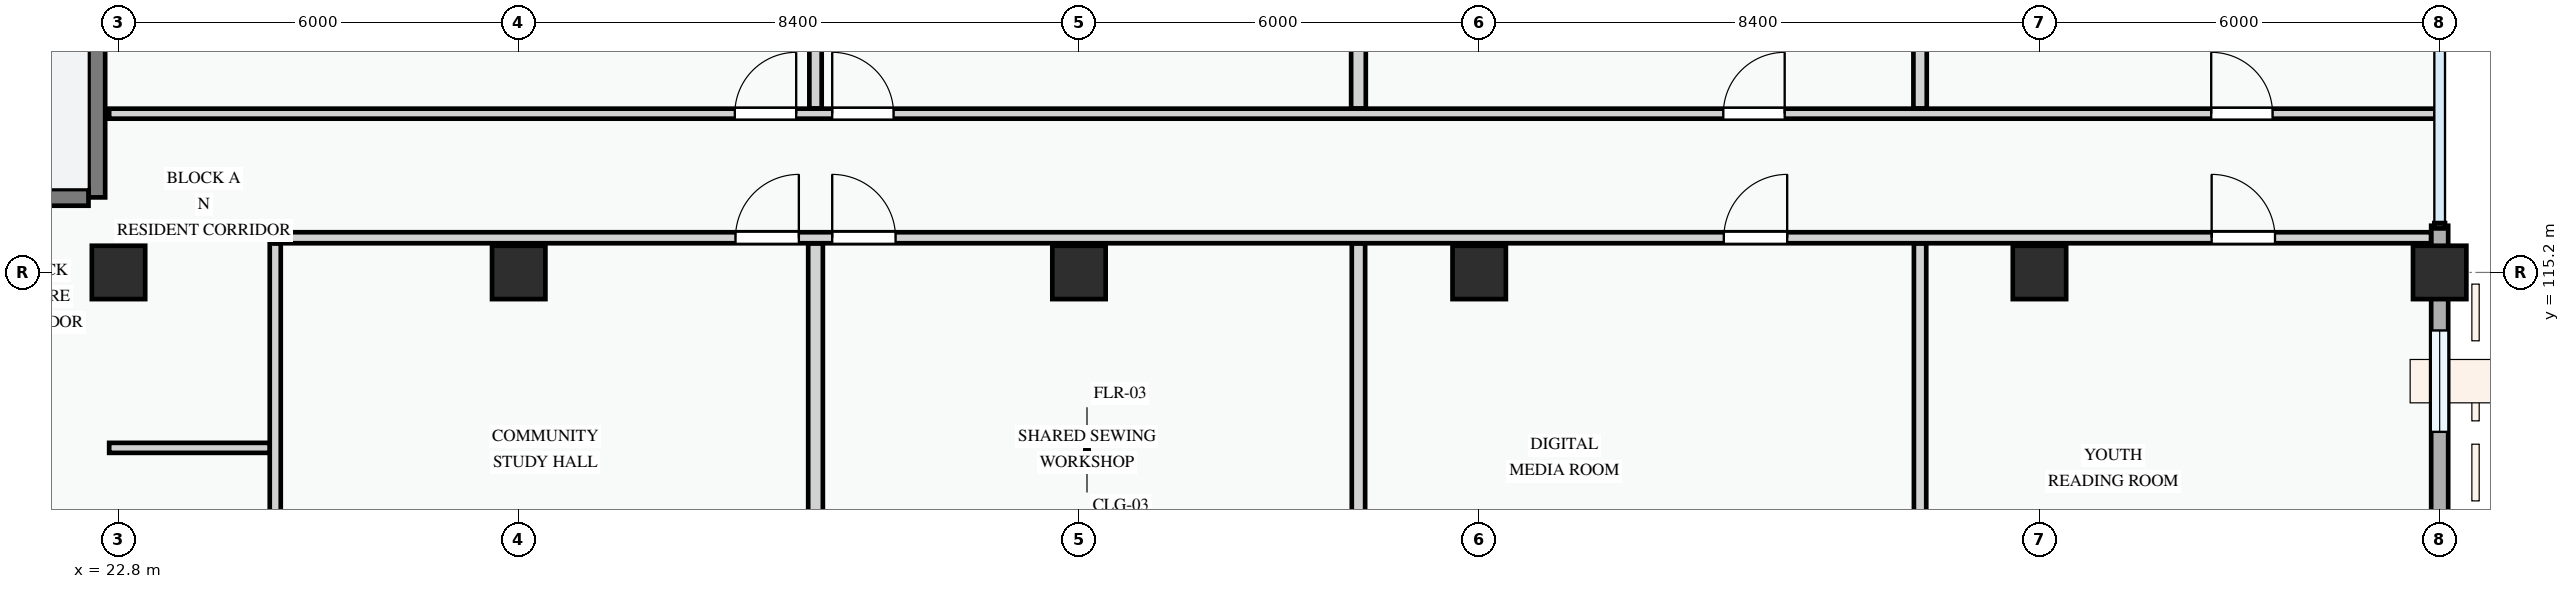
"""IFC4 building model, lengths in metres.
Left out: names, types, materials, properties, quantities, classifications, styles, units other than length and angle.
Written with IfcOpenShell. Run it as: python <this file> out.ifc"""

import sys

from ifc_helpers import new_model, si_unit, direction, frame, frame_2d, origin, origin_2d, place, context, subcontext, project, spatial, rectangle, extrude, element, fill, save


model = new_model("IFC4")
c1 = context("Model", 3, precision=1e-05, world=origin(), true_north=direction((0.0, 1.0)))
c2 = subcontext(c1, "Body", "Model", "MODEL_VIEW")
j1 = project(units=[si_unit("LENGTHUNIT", "METRE"), si_unit("PLANEANGLEUNIT", "RADIAN")], contexts=[c1])
p1 = place(None, origin())
s1 = spatial("IfcSite", under=j1, at=p1, CompositionType="ELEMENT")
p2 = place(p1, origin())
s2 = spatial("IfcBuilding", under=s1, at=p2, CompositionType="ELEMENT")
p3 = place(p2, frame((0.0, 0.0, 4.5)))
s3 = spatial("IfcBuildingStorey", under=s2, at=p3, CompositionType="ELEMENT", Elevation=4.5)
for number, where, z_axis, x_axis in (
    (1, (22.8, 115.2, 0.0), (0.0, 0.0, 1.0), (1.0, 0.0, 0.0)),
    (2, (28.8, 115.2, 0.0), (0.0, 0.0, 1.0), (1.0, 0.0, 0.0)),
    (3, (37.2, 115.2, 0.0), (0.0, 0.0, 1.0), (1.0, 0.0, 0.0)),
    (4, (43.2, 115.2, 0.0), (0.0, 0.0, 1.0), (1.0, 0.0, 0.0)),
    (5, (51.6, 115.2, 0.0), (0.0, 0.0, 1.0), (1.0, 0.0, 0.0)),
    (6, (57.6, 115.2, 0.0), (0.0, 0.0, 1.0), (1.0, 0.0, 0.0)),
):
    element("IfcColumn", number, at=place(p3, frame(where, z_axis=z_axis, x_axis=x_axis)), inside=s3, PredefinedType="COLUMN", context=c2, shape_type="SweptSolid", body=[
        extrude(rectangle(XDim=0.8, YDim=0.8, at=origin_2d()), origin(), (0.0, 0.0, 1.0), 3.6),
    ])
p4 = place(p3, frame((57.6, 109.2, 0.0), z_axis=(0.0, 0.0, 1.0), x_axis=(0.0, 1.0, 0.0)))
e7 = element("IfcWall", 7, at=p4, inside=s3, PredefinedType="STANDARD", context=c2, shape_type="SweptSolid", body=[
    extrude(rectangle(XDim=6.0, YDim=0.255, at=frame_2d((3.0, 0.0))), origin(), (0.0, 0.0, 1.0), 2.875),
])
p5 = place(p4, frame((1.055, 0.0, 0.78)))
e8 = element("IfcOpeningElement", 8, at=p5, cuts=e7, PredefinedType="OPENING", context=c2, shape_type="SweptSolid", body=[
    extrude(rectangle(XDim=1.15, YDim=1.25, at=frame_2d((0.575, 0.625))), frame((0.0, 0.137, 0.0), z_axis=(0.0, -1.0, 0.0), x_axis=(1.0, 0.0, 0.0)), (0.0, 0.0, 1.0), 0.275),
])
p6 = place(p4, frame((3.61, 0.0, 0.78)))
e9 = element("IfcOpeningElement", 9, at=p6, cuts=e7, PredefinedType="OPENING", context=c2, shape_type="SweptSolid", body=[
    extrude(rectangle(XDim=1.52, YDim=1.42, at=frame_2d((0.76, 0.71))), frame((0.0, 0.137, 0.0), z_axis=(0.0, -1.0, 0.0), x_axis=(1.0, 0.0, 0.0)), (0.0, 0.0, 1.0), 0.275),
])
p7 = place(p3, frame((57.6, 115.2, 0.0), z_axis=(0.0, 0.0, 1.0), x_axis=(0.0, 1.0, 0.0)))
e10 = element("IfcWall", 10, at=p7, inside=s3, PredefinedType="STANDARD", context=c2, shape_type="SweptSolid", body=[
    extrude(rectangle(XDim=0.7, YDim=0.255, at=frame_2d((0.35, 0.0))), origin(), (0.0, 0.0, 1.0), 2.725),
])
p8 = place(p3, frame((22.475, 123.25, 0.0), z_axis=(0.0, 0.0, 1.0), x_axis=(0.0, -1.0, 0.0)))
e11 = element("IfcWall", 11, at=p8, inside=s3, PredefinedType="SHEAR", context=c2, shape_type="SweptSolid", body=[
    extrude(rectangle(XDim=6.925, YDim=0.25, at=frame_2d((3.462, 0.0))), origin(), (0.0, 0.0, 1.0), 3.3),
])
p9 = place(p3, frame((8.85, 116.325, 0.0), z_axis=(0.0, 0.0, 1.0), x_axis=(1.0, 0.0, 0.0)))
e12 = element("IfcWall", 12, at=p9, inside=s3, PredefinedType="SHEAR", context=c2, shape_type="SweptSolid", body=[
    extrude(rectangle(XDim=13.5, YDim=0.25, at=frame_2d((6.75, 0.0))), origin(), (0.0, 0.0, 1.0), 3.3),
])
p10 = place(p9, frame((6.2, 0.0, 0.0)))
e13 = element("IfcOpeningElement", 13, at=p10, cuts=e12, PredefinedType="OPENING", context=c2, shape_type="SweptSolid", body=[
    extrude(rectangle(XDim=1.1, YDim=2.15, at=frame_2d((0.55, 1.075))), frame((0.0, 0.135, 0.0), z_axis=(0.0, -1.0, 0.0), x_axis=(1.0, 0.0, 0.0)), (0.0, 0.0, 1.0), 0.27),
])
p11 = place(p3, frame((25.15, 109.33, 0.0), z_axis=(0.0, 0.0, 1.0), x_axis=(0.0, 1.0, 0.0)))
e14 = element("IfcWall", 14, at=p11, inside=s3, PredefinedType="PARTITIONING", context=c2, shape_type="SweptSolid", body=[
    extrude(rectangle(XDim=6.306, YDim=0.165, at=frame_2d((3.153, 0.0))), origin(), (0.0, 0.0, 1.0), 3.3),
])
p12 = place(p3, frame((22.66, 112.57, 0.0), z_axis=(0.0, 0.0, 1.0), x_axis=(1.0, 0.0, 0.0)))
e15 = element("IfcWall", 15, at=p12, inside=s3, PredefinedType="PARTITIONING", context=c2, shape_type="SweptSolid", body=[
    extrude(rectangle(XDim=2.406, YDim=0.15, at=frame_2d((1.203, 0.0))), origin(), (0.0, 0.0, 1.0), 3.3),
])
p13 = place(p3, frame((33.25, 109.26, 0.0), z_axis=(0.0, 0.0, 1.0), x_axis=(0.0, 1.0, 0.0)))
e16 = element("IfcWall", 16, at=p13, inside=s3, PredefinedType="PARTITIONING", context=c2, shape_type="SweptSolid", body=[
    extrude(rectangle(XDim=6.375, YDim=0.22, at=frame_2d((3.188, 0.0))), origin(), (0.0, 0.0, 1.0), 2.885),
])
p14 = place(p3, frame((33.25, 117.657, 0.0), z_axis=(0.0, 0.0, 1.0), x_axis=(0.0, 1.0, 0.0)))
e17 = element("IfcWall", 17, at=p14, inside=s3, PredefinedType="PARTITIONING", context=c2, shape_type="SweptSolid", body=[
    extrude(rectangle(XDim=5.813, YDim=0.185, at=frame_2d((2.907, 0.0))), origin(), (0.0, 0.0, 1.0), 2.885),
])
p15 = place(p3, frame((41.39, 109.33, 0.0), z_axis=(0.0, 0.0, 1.0), x_axis=(0.0, 1.0, 0.0)))
e18 = element("IfcWall", 18, at=p15, inside=s3, PredefinedType="PARTITIONING", context=c2, shape_type="SweptSolid", body=[
    extrude(rectangle(XDim=6.306, YDim=0.2, at=frame_2d((3.153, 0.0))), origin(), (0.0, 0.0, 1.0), 3.3),
])
p16 = place(p3, frame((41.39, 117.657, 0.0), z_axis=(0.0, 0.0, 1.0), x_axis=(0.0, 1.0, 0.0)))
e19 = element("IfcWall", 19, at=p16, inside=s3, PredefinedType="PARTITIONING", context=c2, shape_type="SweptSolid", body=[
    extrude(rectangle(XDim=5.813, YDim=0.22, at=frame_2d((2.907, 0.0))), origin(), (0.0, 0.0, 1.0), 3.3),
])
p17 = place(p3, frame((49.81, 109.33, 0.0), z_axis=(0.0, 0.0, 1.0), x_axis=(0.0, 1.0, 0.0)))
e20 = element("IfcWall", 20, at=p17, inside=s3, PredefinedType="PARTITIONING", context=c2, shape_type="SweptSolid", body=[
    extrude(rectangle(XDim=6.306, YDim=0.185, at=frame_2d((3.153, 0.0))), origin(), (0.0, 0.0, 1.0), 3.3),
])
p18 = place(p3, frame((49.81, 117.657, 0.0), z_axis=(0.0, 0.0, 1.0), x_axis=(0.0, 1.0, 0.0)))
e21 = element("IfcWall", 21, at=p18, inside=s3, PredefinedType="PARTITIONING", context=c2, shape_type="SweptSolid", body=[
    extrude(rectangle(XDim=5.883, YDim=0.2, at=frame_2d((2.941, 0.0))), origin(), (0.0, 0.0, 1.0), 3.3),
])
p19 = place(p3, frame((25.15, 115.72, 0.0), z_axis=(0.0, 0.0, 1.0), x_axis=(1.0, 0.0, 0.0)))
e22 = element("IfcWall", 22, at=p19, inside=s3, PredefinedType="PARTITIONING", context=c2, shape_type="SweptSolid", body=[
    extrude(rectangle(XDim=32.321, YDim=0.165, at=frame_2d((16.16, 0.0))), origin(), (0.0, 0.0, 1.0), 3.3),
])
p20 = place(p19, frame((6.9, 0.0, 0.0)))
e23 = element("IfcOpeningElement", 23, at=p20, cuts=e22, PredefinedType="OPENING", context=c2, shape_type="SweptSolid", body=[
    extrude(rectangle(XDim=0.95, YDim=2.1, at=frame_2d((0.475, 1.05))), frame((0.0, 0.093, 0.0), z_axis=(0.0, -1.0, 0.0), x_axis=(1.0, 0.0, 0.0)), (0.0, 0.0, 1.0), 0.185),
])
p21 = place(p19, frame((8.35, 0.0, 0.0)))
e24 = element("IfcOpeningElement", 24, at=p21, cuts=e22, PredefinedType="OPENING", context=c2, shape_type="SweptSolid", body=[
    extrude(rectangle(XDim=0.95, YDim=2.1, at=frame_2d((0.475, 1.05))), frame((0.0, 0.093, 0.0), z_axis=(0.0, -1.0, 0.0), x_axis=(1.0, 0.0, 0.0)), (0.0, 0.0, 1.0), 0.185),
])
p22 = place(p19, frame((21.718, 0.0, 0.0)))
e25 = element("IfcOpeningElement", 25, at=p22, cuts=e22, PredefinedType="OPENING", context=c2, shape_type="SweptSolid", body=[
    extrude(rectangle(XDim=0.95, YDim=2.1, at=frame_2d((0.475, 1.05))), frame((0.0, 0.093, 0.0), z_axis=(0.0, -1.0, 0.0), x_axis=(1.0, 0.0, 0.0)), (0.0, 0.0, 1.0), 0.185),
])
p23 = place(p19, frame((29.031, 0.0, 0.0)))
e26 = element("IfcOpeningElement", 26, at=p23, cuts=e22, PredefinedType="OPENING", context=c2, shape_type="SweptSolid", body=[
    extrude(rectangle(XDim=0.95, YDim=2.1, at=frame_2d((0.475, 1.05))), frame((0.0, 0.093, 0.0), z_axis=(0.0, -1.0, 0.0), x_axis=(1.0, 0.0, 0.0)), (0.0, 0.0, 1.0), 0.185),
])
p24 = place(p3, frame((22.66, 117.58, 0.0), z_axis=(0.0, 0.0, 1.0), x_axis=(1.0, 0.0, 0.0)))
e27 = element("IfcWall", 27, at=p24, inside=s3, PredefinedType="PARTITIONING", context=c2, shape_type="SweptSolid", body=[
    extrude(rectangle(XDim=34.88, YDim=0.15, at=frame_2d((17.44, 0.0))), origin(), (0.0, 0.0, 1.0), 3.3),
])
p25 = place(p24, frame((9.38, 0.0, 0.0)))
e28 = element("IfcOpeningElement", 28, at=p25, cuts=e27, PredefinedType="OPENING", context=c2, shape_type="SweptSolid", body=[
    extrude(rectangle(XDim=0.92, YDim=2.1, at=frame_2d((0.46, 1.05))), frame((0.0, 0.085, 0.0), z_axis=(0.0, -1.0, 0.0), x_axis=(1.0, 0.0, 0.0)), (0.0, 0.0, 1.0), 0.17),
])
p26 = place(p24, frame((10.84, 0.0, 0.0)))
e29 = element("IfcOpeningElement", 29, at=p26, cuts=e27, PredefinedType="OPENING", context=c2, shape_type="SweptSolid", body=[
    extrude(rectangle(XDim=0.92, YDim=2.1, at=frame_2d((0.46, 1.05))), frame((0.0, 0.085, 0.0), z_axis=(0.0, -1.0, 0.0), x_axis=(1.0, 0.0, 0.0)), (0.0, 0.0, 1.0), 0.17),
])
p27 = place(p24, frame((24.2, 0.0, 0.0)))
e30 = element("IfcOpeningElement", 30, at=p27, cuts=e27, PredefinedType="OPENING", context=c2, shape_type="SweptSolid", body=[
    extrude(rectangle(XDim=0.92, YDim=2.1, at=frame_2d((0.46, 1.05))), frame((0.0, 0.085, 0.0), z_axis=(0.0, -1.0, 0.0), x_axis=(1.0, 0.0, 0.0)), (0.0, 0.0, 1.0), 0.17),
])
p28 = place(p24, frame((31.515, 0.0, 0.0)))
e31 = element("IfcOpeningElement", 31, at=p28, cuts=e27, PredefinedType="OPENING", context=c2, shape_type="SweptSolid", body=[
    extrude(rectangle(XDim=0.92, YDim=2.1, at=frame_2d((0.46, 1.05))), frame((0.0, 0.085, 0.0), z_axis=(0.0, -1.0, 0.0), x_axis=(1.0, 0.0, 0.0)), (0.0, 0.0, 1.0), 0.17),
])
p29 = place(p6, origin())
e32 = element("IfcWindow", 32, at=p29, inside=s3, PartitioningType="SINGLE_PANEL", PredefinedType="WINDOW", context=c2, shape_type="SweptSolid", body=[
    extrude(rectangle(XDim=1.52, YDim=1.42, at=frame_2d((0.76, 0.71))), frame((0.0, 0.03, 0.0), z_axis=(0.0, -1.0, 0.0), x_axis=(1.0, 0.0, 0.0)), (0.0, 0.0, 1.0), 0.06),
])
fill(e9, e32)
p30 = place(p20, origin())
e33 = element("IfcDoor", 33, at=p30, inside=s3, OperationType="SINGLE_SWING_RIGHT", PredefinedType="DOOR", context=c2, shape_type="SweptSolid", body=[
    extrude(rectangle(XDim=0.95, YDim=2.1, at=frame_2d((0.475, 1.05))), frame((0.0, 0.025, 0.0), z_axis=(0.0, -1.0, 0.0), x_axis=(1.0, 0.0, 0.0)), (0.0, 0.0, 1.0), 0.05),
])
fill(e23, e33)
p31 = place(p21, origin())
e34 = element("IfcDoor", 34, at=p31, inside=s3, OperationType="SINGLE_SWING_LEFT", PredefinedType="DOOR", context=c2, shape_type="SweptSolid", body=[
    extrude(rectangle(XDim=0.95, YDim=2.1, at=frame_2d((0.475, 1.05))), frame((0.0, 0.025, 0.0), z_axis=(0.0, -1.0, 0.0), x_axis=(1.0, 0.0, 0.0)), (0.0, 0.0, 1.0), 0.05),
])
fill(e24, e34)
p32 = place(p22, origin())
e35 = element("IfcDoor", 35, at=p32, inside=s3, OperationType="SINGLE_SWING_RIGHT", PredefinedType="DOOR", context=c2, shape_type="SweptSolid", body=[
    extrude(rectangle(XDim=0.95, YDim=2.1, at=frame_2d((0.475, 1.05))), frame((0.0, 0.025, 0.0), z_axis=(0.0, -1.0, 0.0), x_axis=(1.0, 0.0, 0.0)), (0.0, 0.0, 1.0), 0.05),
])
fill(e25, e35)
p33 = place(p23, origin())
e36 = element("IfcDoor", 36, at=p33, inside=s3, OperationType="SINGLE_SWING_LEFT", PredefinedType="DOOR", context=c2, shape_type="SweptSolid", body=[
    extrude(rectangle(XDim=0.95, YDim=2.1, at=frame_2d((0.475, 1.05))), frame((0.0, 0.025, 0.0), z_axis=(0.0, -1.0, 0.0), x_axis=(1.0, 0.0, 0.0)), (0.0, 0.0, 1.0), 0.05),
])
fill(e26, e36)
p34 = place(p25, origin())
e37 = element("IfcDoor", 37, at=p34, inside=s3, OperationType="SINGLE_SWING_RIGHT", PredefinedType="DOOR", context=c2, shape_type="SweptSolid", body=[
    extrude(rectangle(XDim=0.92, YDim=2.1, at=frame_2d((0.46, 1.05))), frame((0.0, 0.025, 0.0), z_axis=(0.0, -1.0, 0.0), x_axis=(1.0, 0.0, 0.0)), (0.0, 0.0, 1.0), 0.05),
])
fill(e28, e37)
p35 = place(p26, origin())
e38 = element("IfcDoor", 38, at=p35, inside=s3, OperationType="SINGLE_SWING_LEFT", PredefinedType="DOOR", context=c2, shape_type="SweptSolid", body=[
    extrude(rectangle(XDim=0.92, YDim=2.1, at=frame_2d((0.46, 1.05))), frame((0.0, 0.025, 0.0), z_axis=(0.0, -1.0, 0.0), x_axis=(1.0, 0.0, 0.0)), (0.0, 0.0, 1.0), 0.05),
])
fill(e29, e38)
p36 = place(p27, origin())
e39 = element("IfcDoor", 39, at=p36, inside=s3, OperationType="SINGLE_SWING_RIGHT", PredefinedType="DOOR", context=c2, shape_type="SweptSolid", body=[
    extrude(rectangle(XDim=0.92, YDim=2.1, at=frame_2d((0.46, 1.05))), frame((0.0, 0.025, 0.0), z_axis=(0.0, -1.0, 0.0), x_axis=(1.0, 0.0, 0.0)), (0.0, 0.0, 1.0), 0.05),
])
fill(e30, e39)
p37 = place(p28, origin())
e40 = element("IfcDoor", 40, at=p37, inside=s3, OperationType="SINGLE_SWING_LEFT", PredefinedType="DOOR", context=c2, shape_type="SweptSolid", body=[
    extrude(rectangle(XDim=0.92, YDim=2.1, at=frame_2d((0.46, 1.05))), frame((0.0, 0.025, 0.0), z_axis=(0.0, -1.0, 0.0), x_axis=(1.0, 0.0, 0.0)), (0.0, 0.0, 1.0), 0.05),
])
fill(e31, e40)
save(model, sys.argv[1])
